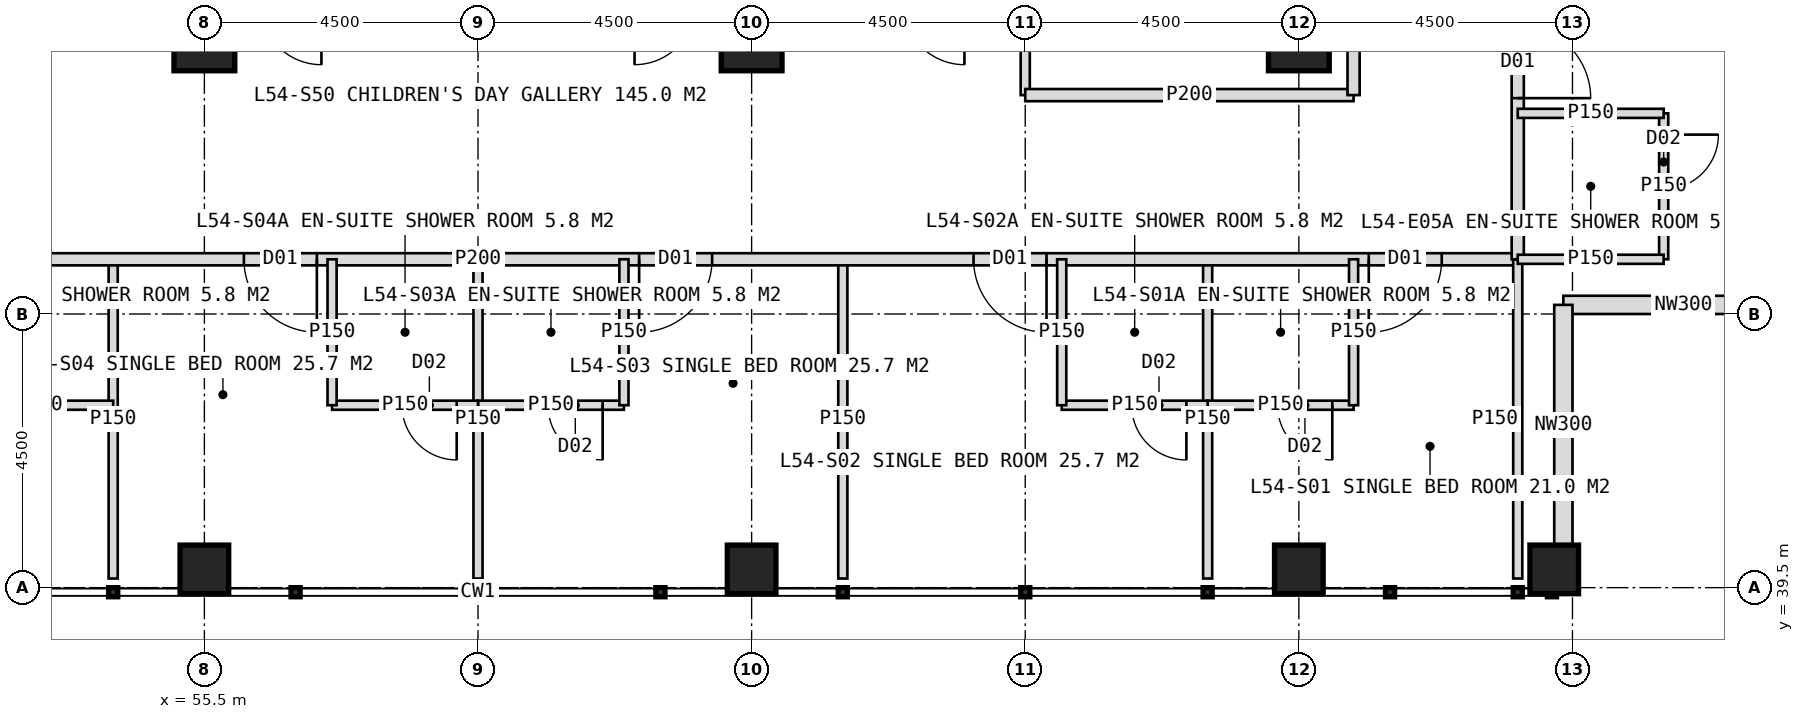
"""IFC4 building model, lengths in metres.
Left out: names, types, materials, properties, quantities, classifications, styles, units other than length and angle.
Written with IfcOpenShell. Run it as: python <this file> out.ifc"""

import sys

from ifc_helpers import new_model, si_unit, direction, frame, frame_2d, origin, origin_2d, place, context, subcontext, project, spatial, rectangle, hollow_rectangle, extrude, element, fill, save


model = new_model("IFC4")
c1 = context("Model", 3, precision=1e-05, world=origin(), true_north=direction((0.0, 1.0)))
c2 = subcontext(c1, "Body", "Model", "MODEL_VIEW")
j1 = project(units=[si_unit("LENGTHUNIT", "METRE"), si_unit("PLANEANGLEUNIT", "RADIAN")], contexts=[c1])
p1 = place(None, origin())
s1 = spatial("IfcSite", under=j1, at=p1, CompositionType="ELEMENT")
p2 = place(p1, origin())
s2 = spatial("IfcBuilding", under=s1, at=p2, CompositionType="ELEMENT")
p3 = place(p2, frame((0.0, 0.0, 225.0)))
s3 = spatial("IfcBuildingStorey", under=s2, at=p3, CompositionType="ELEMENT", Elevation=225.0)
for number, where, z_axis, x_axis in (
    (1, (73.5, 48.5, 0.0), (0.0, 0.0, 1.0), (1.0, 0.0, 0.0)),
    (2, (55.5, 48.5, 0.0), (0.0, 0.0, 1.0), (1.0, 0.0, 0.0)),
    (3, (64.5, 48.5, 0.0), (0.0, 0.0, 1.0), (1.0, 0.0, 0.0)),
):
    element("IfcColumn", number, at=place(p3, frame(where, z_axis=z_axis, x_axis=x_axis)), inside=s3, PredefinedType="COLUMN", context=c2, shape_type="SweptSolid", body=[
        extrude(hollow_rectangle(XDim=1.0, YDim=1.0, WallThickness=0.1, at=origin_2d()), origin(), (0.0, 0.0, 1.0), 4.0),
    ])
for number, where, z_axis, x_axis in (
    (4, (55.5, 39.8, 0.0), (0.0, 0.0, 1.0), (1.0, 0.0, 0.0)),
    (5, (64.5, 39.8, 0.0), (0.0, 0.0, 1.0), (1.0, 0.0, 0.0)),
    (6, (73.5, 39.8, 0.0), (0.0, 0.0, 1.0), (1.0, 0.0, 0.0)),
    (7, (77.7, 39.8, 0.0), (0.0, 0.0, 1.0), (1.0, 0.0, 0.0)),
):
    element("IfcColumn", number, at=place(p3, frame(where, z_axis=z_axis, x_axis=x_axis)), inside=s3, PredefinedType="COLUMN", context=c2, shape_type="SweptSolid", body=[
        extrude(hollow_rectangle(XDim=0.8, YDim=0.8, WallThickness=0.08, at=origin_2d()), origin(), (0.0, 0.0, 1.0), 4.0),
    ])
for number, where, z_axis, x_axis in (
    (8, (81.8, 44.15, 0.0), (0.0, 0.0, 1.0), (-1.0, 0.0, 0.0)),
    (9, (77.85, 44.15, 0.0), (0.0, 0.0, 1.0), (0.0, -1.0, 0.0)),
):
    element("IfcWall", number, at=place(p3, frame(where, z_axis=z_axis, x_axis=x_axis)), inside=s3, PredefinedType="ELEMENTEDWALL", context=c2, shape_type="SweptSolid", body=[
        extrude(rectangle(XDim=3.95, YDim=0.3, at=frame_2d((1.975, 0.0))), origin(), (0.0, 0.0, 1.0), 2.85),
    ])
for number, where, z_axis, x_axis in (
    (10, (72.0, 44.9, 0.0), (0.0, 0.0, 1.0), (0.0, -1.0, 0.0)),
    (11, (66.0, 44.9, 0.0), (0.0, 0.0, 1.0), (0.0, -1.0, 0.0)),
):
    element("IfcWall", number, at=place(p3, frame(where, z_axis=z_axis, x_axis=x_axis)), inside=s3, PredefinedType="PARTITIONING", context=c2, shape_type="SweptSolid", body=[
        extrude(rectangle(XDim=5.25, YDim=0.15, at=frame_2d((2.625, 0.0))), origin(), (0.0, 0.0, 1.0), 3.75),
    ])
p4 = place(p3, frame((60.0, 44.9, 0.0), z_axis=(0.0, 0.0, 1.0), x_axis=(0.0, -1.0, 0.0)))
e12 = element("IfcWall", 12, at=p4, inside=s3, PredefinedType="PARTITIONING", context=c2, shape_type="SweptSolid", body=[
    extrude(rectangle(XDim=5.25, YDim=0.15, at=frame_2d((2.625, 0.0))), origin(), (0.0, 0.0, 1.0), 2.95),
])
p5 = place(p3, frame((54.0, 44.9, 0.0), z_axis=(0.0, 0.0, 1.0), x_axis=(0.0, -1.0, 0.0)))
e13 = element("IfcWall", 13, at=p5, inside=s3, PredefinedType="PARTITIONING", context=c2, shape_type="SweptSolid", body=[
    extrude(rectangle(XDim=5.25, YDim=0.15, at=frame_2d((2.625, 0.0))), origin(), (0.0, 0.0, 1.0), 3.75),
])
p6 = place(p3, frame((77.1, 44.9, 0.0), z_axis=(0.0, 0.0, 1.0), x_axis=(-1.0, 0.0, 0.0)))
e14 = element("IfcWall", 14, at=p6, inside=s3, PredefinedType="PARTITIONING", context=c2, shape_type="SweptSolid", body=[
    extrude(rectangle(XDim=34.2, YDim=0.2, at=frame_2d((17.1, 0.0))), origin(), (0.0, 0.0, 1.0), 3.75),
])
p7 = place(p6, frame((1.25, 0.0, 0.0)))
e15 = element("IfcOpeningElement", 15, at=p7, cuts=e14, PredefinedType="OPENING", context=c2, shape_type="SweptSolid", body=[
    extrude(rectangle(XDim=1.2, YDim=2.2, at=frame_2d((0.6, 1.1))), frame((0.0, 0.11, 0.0), z_axis=(0.0, -1.0, 0.0), x_axis=(1.0, 0.0, 0.0)), (0.0, 0.0, 1.0), 0.22),
])
p8 = place(p6, frame((7.75, 0.0, 0.0)))
e16 = element("IfcOpeningElement", 16, at=p8, cuts=e14, PredefinedType="OPENING", context=c2, shape_type="SweptSolid", body=[
    extrude(rectangle(XDim=1.2, YDim=2.2, at=frame_2d((0.6, 1.1))), frame((0.0, 0.11, 0.0), z_axis=(0.0, -1.0, 0.0), x_axis=(1.0, 0.0, 0.0)), (0.0, 0.0, 1.0), 0.22),
])
p9 = place(p6, frame((13.25, 0.0, 0.0)))
e17 = element("IfcOpeningElement", 17, at=p9, cuts=e14, PredefinedType="OPENING", context=c2, shape_type="SweptSolid", body=[
    extrude(rectangle(XDim=1.2, YDim=2.2, at=frame_2d((0.6, 1.1))), frame((0.0, 0.11, 0.0), z_axis=(0.0, -1.0, 0.0), x_axis=(1.0, 0.0, 0.0)), (0.0, 0.0, 1.0), 0.22),
])
p10 = place(p6, frame((19.75, 0.0, 0.0)))
e18 = element("IfcOpeningElement", 18, at=p10, cuts=e14, PredefinedType="OPENING", context=c2, shape_type="SweptSolid", body=[
    extrude(rectangle(XDim=1.2, YDim=2.2, at=frame_2d((0.6, 1.1))), frame((0.0, 0.11, 0.0), z_axis=(0.0, -1.0, 0.0), x_axis=(1.0, 0.0, 0.0)), (0.0, 0.0, 1.0), 0.22),
])
p11 = place(p6, frame((30.35, 0.0, 0.0)))
e19 = element("IfcOpeningElement", 19, at=p11, cuts=e14, PredefinedType="OPENING", context=c2, shape_type="SweptSolid", body=[
    extrude(rectangle(XDim=1.2, YDim=2.2, at=frame_2d((0.6, 1.1))), frame((0.0, 0.11, 0.0), z_axis=(0.0, -1.0, 0.0), x_axis=(1.0, 0.0, 0.0)), (0.0, 0.0, 1.0), 0.22),
])
p12 = place(p3, frame((77.1, 44.9, 0.0), z_axis=(0.0, 0.0, 1.0), x_axis=(0.0, -1.0, 0.0)))
e20 = element("IfcWall", 20, at=p12, inside=s3, PredefinedType="PARTITIONING", context=c2, shape_type="SweptSolid", body=[
    extrude(rectangle(XDim=5.25, YDim=0.15, at=frame_2d((2.625, 0.0))), origin(), (0.0, 0.0, 1.0), 3.75),
])
p13 = place(p3, frame((74.4, 42.5, 0.0), z_axis=(0.0, 0.0, 1.0), x_axis=(-1.0, 0.0, 0.0)))
e21 = element("IfcWall", 21, at=p13, inside=s3, PredefinedType="PARTITIONING", context=c2, shape_type="SweptSolid", body=[
    extrude(rectangle(XDim=2.4, YDim=0.15, at=frame_2d((1.2, 0.0))), origin(), (0.0, 0.0, 1.0), 3.75),
])
p14 = place(p13, frame((0.35, 0.0, 0.0)))
e22 = element("IfcOpeningElement", 22, at=p14, cuts=e21, PredefinedType="OPENING", context=c2, shape_type="SweptSolid", body=[
    extrude(rectangle(XDim=0.9, YDim=2.1, at=frame_2d((0.45, 1.05))), frame((0.0, 0.085, 0.0), z_axis=(0.0, -1.0, 0.0), x_axis=(1.0, 0.0, 0.0)), (0.0, 0.0, 1.0), 0.17),
])
p15 = place(p3, frame((74.4, 44.9, 0.0), z_axis=(0.0, 0.0, 1.0), x_axis=(0.0, -1.0, 0.0)))
e23 = element("IfcWall", 23, at=p15, inside=s3, PredefinedType="PARTITIONING", context=c2, shape_type="SweptSolid", body=[
    extrude(rectangle(XDim=2.4, YDim=0.15, at=frame_2d((1.2, 0.0))), origin(), (0.0, 0.0, 1.0), 3.75),
])
p16 = place(p3, frame((72.0, 42.5, 0.0), z_axis=(0.0, 0.0, 1.0), x_axis=(-1.0, 0.0, 0.0)))
e24 = element("IfcWall", 24, at=p16, inside=s3, PredefinedType="PARTITIONING", context=c2, shape_type="SweptSolid", body=[
    extrude(rectangle(XDim=2.4, YDim=0.15, at=frame_2d((1.2, 0.0))), origin(), (0.0, 0.0, 1.0), 3.75),
])
p17 = place(p16, frame((0.35, 0.0, 0.0)))
e25 = element("IfcOpeningElement", 25, at=p17, cuts=e24, PredefinedType="OPENING", context=c2, shape_type="SweptSolid", body=[
    extrude(rectangle(XDim=0.9, YDim=2.1, at=frame_2d((0.45, 1.05))), frame((0.0, 0.085, 0.0), z_axis=(0.0, -1.0, 0.0), x_axis=(1.0, 0.0, 0.0)), (0.0, 0.0, 1.0), 0.17),
])
p18 = place(p3, frame((69.6, 44.9, 0.0), z_axis=(0.0, 0.0, 1.0), x_axis=(0.0, -1.0, 0.0)))
e26 = element("IfcWall", 26, at=p18, inside=s3, PredefinedType="PARTITIONING", context=c2, shape_type="SweptSolid", body=[
    extrude(rectangle(XDim=2.4, YDim=0.15, at=frame_2d((1.2, 0.0))), origin(), (0.0, 0.0, 1.0), 3.75),
])
p19 = place(p3, frame((62.4, 42.5, 0.0), z_axis=(0.0, 0.0, 1.0), x_axis=(-1.0, 0.0, 0.0)))
e27 = element("IfcWall", 27, at=p19, inside=s3, PredefinedType="PARTITIONING", context=c2, shape_type="SweptSolid", body=[
    extrude(rectangle(XDim=2.4, YDim=0.15, at=frame_2d((1.2, 0.0))), origin(), (0.0, 0.0, 1.0), 3.75),
])
p20 = place(p19, frame((0.35, 0.0, 0.0)))
e28 = element("IfcOpeningElement", 28, at=p20, cuts=e27, PredefinedType="OPENING", context=c2, shape_type="SweptSolid", body=[
    extrude(rectangle(XDim=0.9, YDim=2.1, at=frame_2d((0.45, 1.05))), frame((0.0, 0.085, 0.0), z_axis=(0.0, -1.0, 0.0), x_axis=(1.0, 0.0, 0.0)), (0.0, 0.0, 1.0), 0.17),
])
p21 = place(p3, frame((62.4, 44.9, 0.0), z_axis=(0.0, 0.0, 1.0), x_axis=(0.0, -1.0, 0.0)))
e29 = element("IfcWall", 29, at=p21, inside=s3, PredefinedType="PARTITIONING", context=c2, shape_type="SweptSolid", body=[
    extrude(rectangle(XDim=2.4, YDim=0.15, at=frame_2d((1.2, 0.0))), origin(), (0.0, 0.0, 1.0), 3.75),
])
p22 = place(p3, frame((60.0, 42.5, 0.0), z_axis=(0.0, 0.0, 1.0), x_axis=(-1.0, 0.0, 0.0)))
e30 = element("IfcWall", 30, at=p22, inside=s3, PredefinedType="PARTITIONING", context=c2, shape_type="SweptSolid", body=[
    extrude(rectangle(XDim=2.4, YDim=0.15, at=frame_2d((1.2, 0.0))), origin(), (0.0, 0.0, 1.0), 3.75),
])
p23 = place(p22, frame((0.35, 0.0, 0.0)))
e31 = element("IfcOpeningElement", 31, at=p23, cuts=e30, PredefinedType="OPENING", context=c2, shape_type="SweptSolid", body=[
    extrude(rectangle(XDim=0.9, YDim=2.1, at=frame_2d((0.45, 1.05))), frame((0.0, 0.085, 0.0), z_axis=(0.0, -1.0, 0.0), x_axis=(1.0, 0.0, 0.0)), (0.0, 0.0, 1.0), 0.17),
])
p24 = place(p3, frame((57.6, 44.9, 0.0), z_axis=(0.0, 0.0, 1.0), x_axis=(0.0, -1.0, 0.0)))
e32 = element("IfcWall", 32, at=p24, inside=s3, PredefinedType="PARTITIONING", context=c2, shape_type="SweptSolid", body=[
    extrude(rectangle(XDim=2.4, YDim=0.15, at=frame_2d((1.2, 0.0))), origin(), (0.0, 0.0, 1.0), 3.75),
])
p25 = place(p3, frame((54.0, 42.5, 0.0), z_axis=(0.0, 0.0, 1.0), x_axis=(-1.0, 0.0, 0.0)))
e33 = element("IfcWall", 33, at=p25, inside=s3, PredefinedType="PARTITIONING", context=c2, shape_type="SweptSolid", body=[
    extrude(rectangle(XDim=2.4, YDim=0.15, at=frame_2d((1.2, 0.0))), origin(), (0.0, 0.0, 1.0), 3.75),
])
p26 = place(p25, frame((1.15, 0.0, 0.0)))
e34 = element("IfcOpeningElement", 34, at=p26, cuts=e33, PredefinedType="OPENING", context=c2, shape_type="SweptSolid", body=[
    extrude(rectangle(XDim=0.9, YDim=2.1, at=frame_2d((0.45, 1.05))), frame((0.0, 0.085, 0.0), z_axis=(0.0, -1.0, 0.0), x_axis=(1.0, 0.0, 0.0)), (0.0, 0.0, 1.0), 0.17),
])
p27 = place(p3, frame((69.0, 53.0, 0.0), z_axis=(0.0, 0.0, 1.0), x_axis=(0.0, -1.0, 0.0)))
e35 = element("IfcWall", 35, at=p27, inside=s3, PredefinedType="PARTITIONING", context=c2, shape_type="SweptSolid", body=[
    extrude(rectangle(XDim=5.4, YDim=0.15, at=frame_2d((2.7, 0.0))), origin(), (0.0, 0.0, 1.0), 3.75),
])
p28 = place(p3, frame((74.4, 47.6, 0.0), z_axis=(0.0, 0.0, 1.0), x_axis=(-1.0, 0.0, 0.0)))
e36 = element("IfcWall", 36, at=p28, inside=s3, PredefinedType="PARTITIONING", context=c2, shape_type="SweptSolid", body=[
    extrude(rectangle(XDim=5.4, YDim=0.2, at=frame_2d((2.7, 0.0))), origin(), (0.0, 0.0, 1.0), 3.75),
])
p29 = place(p3, frame((77.1, 79.1, 0.0), z_axis=(0.0, 0.0, 1.0), x_axis=(0.0, -1.0, 0.0)))
e37 = element("IfcWall", 37, at=p29, inside=s3, PredefinedType="PARTITIONING", context=c2, shape_type="SweptSolid", body=[
    extrude(rectangle(XDim=34.2, YDim=0.2, at=frame_2d((17.1, 0.0))), origin(), (0.0, 0.0, 1.0), 3.75),
])
p30 = place(p29, frame((3.65, 0.0, 0.0)))
e38 = element("IfcOpeningElement", 38, at=p30, cuts=e37, PredefinedType="OPENING", context=c2, shape_type="SweptSolid", body=[
    extrude(rectangle(XDim=1.2, YDim=2.2, at=frame_2d((0.6, 1.1))), frame((0.0, 0.11, 0.0), z_axis=(0.0, -1.0, 0.0), x_axis=(1.0, 0.0, 0.0)), (0.0, 0.0, 1.0), 0.22),
])
p31 = place(p29, frame((10.75, 0.0, 0.0)))
e39 = element("IfcOpeningElement", 39, at=p31, cuts=e37, PredefinedType="OPENING", context=c2, shape_type="SweptSolid", body=[
    extrude(rectangle(XDim=1.2, YDim=2.2, at=frame_2d((0.6, 1.1))), frame((0.0, 0.11, 0.0), z_axis=(0.0, -1.0, 0.0), x_axis=(1.0, 0.0, 0.0)), (0.0, 0.0, 1.0), 0.22),
])
p32 = place(p29, frame((15.1, 0.0, 0.0)))
e40 = element("IfcOpeningElement", 40, at=p32, cuts=e37, PredefinedType="OPENING", context=c2, shape_type="SweptSolid", body=[
    extrude(rectangle(XDim=1.0, YDim=2.1, at=frame_2d((0.5, 1.05))), frame((0.0, 0.11, 0.0), z_axis=(0.0, -1.0, 0.0), x_axis=(1.0, 0.0, 0.0)), (0.0, 0.0, 1.0), 0.22),
])
p33 = place(p29, frame((19.75, 0.0, 0.0)))
e41 = element("IfcOpeningElement", 41, at=p33, cuts=e37, PredefinedType="OPENING", context=c2, shape_type="SweptSolid", body=[
    extrude(rectangle(XDim=1.2, YDim=2.2, at=frame_2d((0.6, 1.1))), frame((0.0, 0.11, 0.0), z_axis=(0.0, -1.0, 0.0), x_axis=(1.0, 0.0, 0.0)), (0.0, 0.0, 1.0), 0.22),
])
p34 = place(p29, frame((30.35, 0.0, 0.0)))
e42 = element("IfcOpeningElement", 42, at=p34, cuts=e37, PredefinedType="OPENING", context=c2, shape_type="SweptSolid", body=[
    extrude(rectangle(XDim=1.2, YDim=2.2, at=frame_2d((0.6, 1.1))), frame((0.0, 0.11, 0.0), z_axis=(0.0, -1.0, 0.0), x_axis=(1.0, 0.0, 0.0)), (0.0, 0.0, 1.0), 0.22),
])
p35 = place(p3, frame((79.5, 47.3, 0.0), z_axis=(0.0, 0.0, 1.0), x_axis=(0.0, -1.0, 0.0)))
e43 = element("IfcWall", 43, at=p35, inside=s3, PredefinedType="PARTITIONING", context=c2, shape_type="SweptSolid", body=[
    extrude(rectangle(XDim=2.4, YDim=0.15, at=frame_2d((1.2, 0.0))), origin(), (0.0, 0.0, 1.0), 3.75),
])
p36 = place(p35, frame((0.35, 0.0, 0.0)))
e44 = element("IfcOpeningElement", 44, at=p36, cuts=e43, PredefinedType="OPENING", context=c2, shape_type="SweptSolid", body=[
    extrude(rectangle(XDim=0.9, YDim=2.1, at=frame_2d((0.45, 1.05))), frame((0.0, 0.085, 0.0), z_axis=(0.0, -1.0, 0.0), x_axis=(1.0, 0.0, 0.0)), (0.0, 0.0, 1.0), 0.17),
])
for number, where, z_axis, x_axis in (
    (45, (77.1, 47.3, 0.0), (0.0, 0.0, 1.0), (1.0, 0.0, 0.0)),
    (46, (77.1, 44.9, 0.0), (0.0, 0.0, 1.0), (1.0, 0.0, 0.0)),
):
    element("IfcWall", number, at=place(p3, frame(where, z_axis=z_axis, x_axis=x_axis)), inside=s3, PredefinedType="PARTITIONING", context=c2, shape_type="SweptSolid", body=[
        extrude(rectangle(XDim=2.4, YDim=0.15, at=frame_2d((1.2, 0.0))), origin(), (0.0, 0.0, 1.0), 3.75),
    ])
p37 = place(p3, frame((74.4, 62.0, 0.0), z_axis=(0.0, 0.0, 1.0), x_axis=(0.0, -1.0, 0.0)))
e47 = element("IfcWall", 47, at=p37, inside=s3, PredefinedType="PARTITIONING", context=c2, shape_type="SweptSolid", body=[
    extrude(rectangle(XDim=14.4, YDim=0.2, at=frame_2d((7.2, 0.0))), origin(), (0.0, 0.0, 1.0), 3.75),
])
p38 = place(p37, frame((2.5, 0.0, 0.0)))
e48 = element("IfcOpeningElement", 48, at=p38, cuts=e47, PredefinedType="OPENING", context=c2, shape_type="SweptSolid", body=[
    extrude(rectangle(XDim=1.0, YDim=2.1, at=frame_2d((0.5, 1.05))), frame((0.0, 0.11, 0.0), z_axis=(0.0, -1.0, 0.0), x_axis=(1.0, 0.0, 0.0)), (0.0, 0.0, 1.0), 0.22),
])
p39 = place(p37, frame((7.0, 0.0, 0.0)))
e49 = element("IfcOpeningElement", 49, at=p39, cuts=e47, PredefinedType="OPENING", context=c2, shape_type="SweptSolid", body=[
    extrude(rectangle(XDim=1.0, YDim=2.1, at=frame_2d((0.5, 1.05))), frame((0.0, 0.11, 0.0), z_axis=(0.0, -1.0, 0.0), x_axis=(1.0, 0.0, 0.0)), (0.0, 0.0, 1.0), 0.22),
])
p40 = place(p37, frame((11.2, 0.0, 0.0)))
e50 = element("IfcOpeningElement", 50, at=p40, cuts=e47, PredefinedType="OPENING", context=c2, shape_type="SweptSolid", body=[
    extrude(rectangle(XDim=1.0, YDim=2.1, at=frame_2d((0.5, 1.05))), frame((0.0, 0.11, 0.0), z_axis=(0.0, -1.0, 0.0), x_axis=(1.0, 0.0, 0.0)), (0.0, 0.0, 1.0), 0.22),
])
p41 = place(p7, origin())
e51 = element("IfcDoor", 51, at=p41, inside=s3, OperationType="SINGLE_SWING_RIGHT", PredefinedType="DOOR", context=c2, shape_type="SweptSolid", body=[
    extrude(rectangle(XDim=1.2, YDim=2.2, at=frame_2d((0.6, 1.1))), frame((0.0, 0.025, 0.0), z_axis=(0.0, -1.0, 0.0), x_axis=(1.0, 0.0, 0.0)), (0.0, 0.0, 1.0), 0.05),
])
fill(e15, e51)
p42 = place(p14, origin())
e52 = element("IfcDoor", 52, at=p42, inside=s3, OperationType="SINGLE_SWING_LEFT", PredefinedType="DOOR", context=c2, shape_type="SweptSolid", body=[
    extrude(rectangle(XDim=0.9, YDim=2.1, at=frame_2d((0.45, 1.05))), frame((0.0, 0.025, 0.0), z_axis=(0.0, -1.0, 0.0), x_axis=(1.0, 0.0, 0.0)), (0.0, 0.0, 1.0), 0.05),
])
fill(e22, e52)
p43 = place(p8, origin())
e53 = element("IfcDoor", 53, at=p43, inside=s3, OperationType="SINGLE_SWING_LEFT", PredefinedType="DOOR", context=c2, shape_type="SweptSolid", body=[
    extrude(rectangle(XDim=1.2, YDim=2.2, at=frame_2d((0.6, 1.1))), frame((0.0, 0.025, 0.0), z_axis=(0.0, -1.0, 0.0), x_axis=(1.0, 0.0, 0.0)), (0.0, 0.0, 1.0), 0.05),
])
fill(e16, e53)
p44 = place(p17, origin())
e54 = element("IfcDoor", 54, at=p44, inside=s3, OperationType="SINGLE_SWING_LEFT", PredefinedType="DOOR", context=c2, shape_type="SweptSolid", body=[
    extrude(rectangle(XDim=0.9, YDim=2.1, at=frame_2d((0.45, 1.05))), frame((0.0, 0.025, 0.0), z_axis=(0.0, -1.0, 0.0), x_axis=(1.0, 0.0, 0.0)), (0.0, 0.0, 1.0), 0.05),
])
fill(e25, e54)
p45 = place(p9, origin())
e55 = element("IfcDoor", 55, at=p45, inside=s3, OperationType="SINGLE_SWING_RIGHT", PredefinedType="DOOR", context=c2, shape_type="SweptSolid", body=[
    extrude(rectangle(XDim=1.2, YDim=2.2, at=frame_2d((0.6, 1.1))), frame((0.0, 0.025, 0.0), z_axis=(0.0, -1.0, 0.0), x_axis=(1.0, 0.0, 0.0)), (0.0, 0.0, 1.0), 0.05),
])
fill(e17, e55)
p46 = place(p20, origin())
e56 = element("IfcDoor", 56, at=p46, inside=s3, OperationType="SINGLE_SWING_LEFT", PredefinedType="DOOR", context=c2, shape_type="SweptSolid", body=[
    extrude(rectangle(XDim=0.9, YDim=2.1, at=frame_2d((0.45, 1.05))), frame((0.0, 0.025, 0.0), z_axis=(0.0, -1.0, 0.0), x_axis=(1.0, 0.0, 0.0)), (0.0, 0.0, 1.0), 0.05),
])
fill(e28, e56)
p47 = place(p10, origin())
e57 = element("IfcDoor", 57, at=p47, inside=s3, OperationType="SINGLE_SWING_LEFT", PredefinedType="DOOR", context=c2, shape_type="SweptSolid", body=[
    extrude(rectangle(XDim=1.2, YDim=2.2, at=frame_2d((0.6, 1.1))), frame((0.0, 0.025, 0.0), z_axis=(0.0, -1.0, 0.0), x_axis=(1.0, 0.0, 0.0)), (0.0, 0.0, 1.0), 0.05),
])
fill(e18, e57)
p48 = place(p23, origin())
e58 = element("IfcDoor", 58, at=p48, inside=s3, OperationType="SINGLE_SWING_LEFT", PredefinedType="DOOR", context=c2, shape_type="SweptSolid", body=[
    extrude(rectangle(XDim=0.9, YDim=2.1, at=frame_2d((0.45, 1.05))), frame((0.0, 0.025, 0.0), z_axis=(0.0, -1.0, 0.0), x_axis=(1.0, 0.0, 0.0)), (0.0, 0.0, 1.0), 0.05),
])
fill(e31, e58)
p49 = place(p34, origin())
e59 = element("IfcDoor", 59, at=p49, inside=s3, OperationType="SINGLE_SWING_RIGHT", PredefinedType="DOOR", context=c2, shape_type="SweptSolid", body=[
    extrude(rectangle(XDim=1.2, YDim=2.2, at=frame_2d((0.6, 1.1))), frame((0.0, 0.025, 0.0), z_axis=(0.0, -1.0, 0.0), x_axis=(1.0, 0.0, 0.0)), (0.0, 0.0, 1.0), 0.05),
])
fill(e42, e59)
p50 = place(p36, origin())
e60 = element("IfcDoor", 60, at=p50, inside=s3, OperationType="SINGLE_SWING_LEFT", PredefinedType="DOOR", context=c2, shape_type="SweptSolid", body=[
    extrude(rectangle(XDim=0.9, YDim=2.1, at=frame_2d((0.45, 1.05))), frame((0.0, 0.025, 0.0), z_axis=(0.0, -1.0, 0.0), x_axis=(1.0, 0.0, 0.0)), (0.0, 0.0, 1.0), 0.05),
])
fill(e44, e60)
save(model, sys.argv[1])
